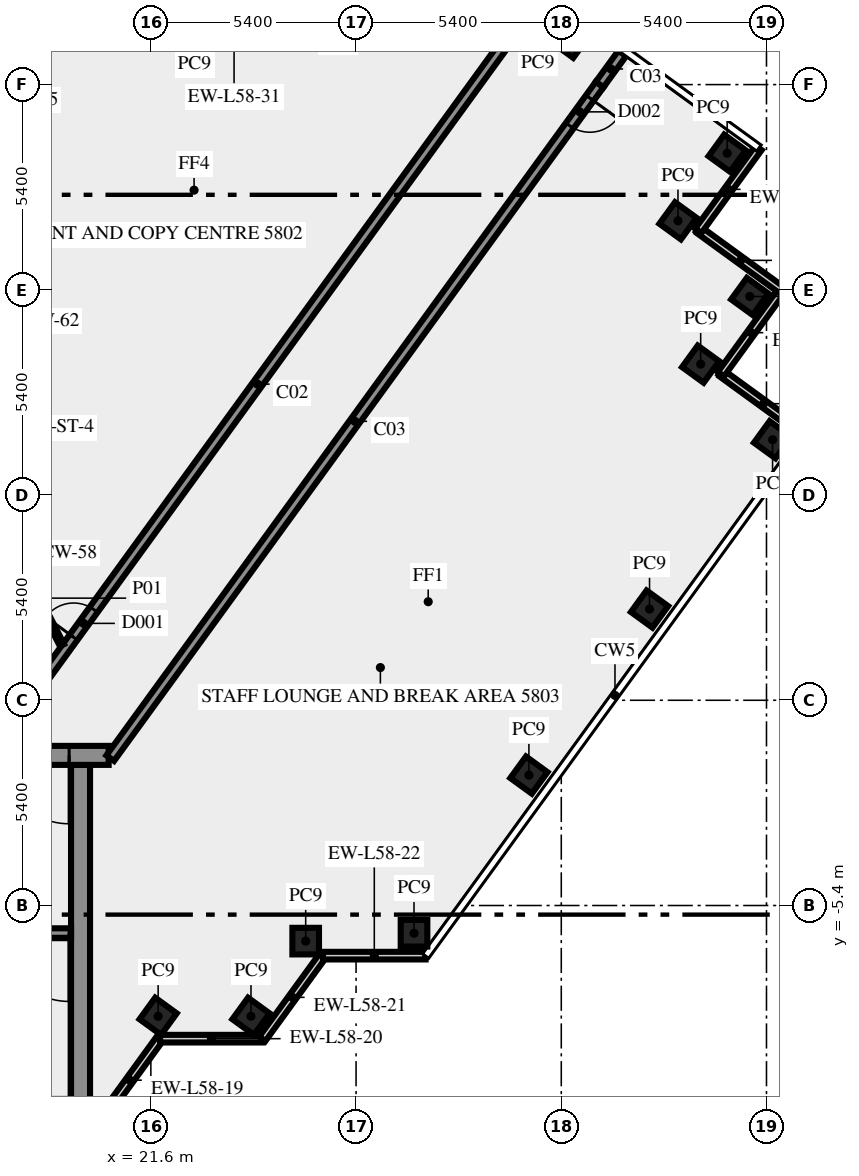
"""IFC4 building model, lengths in metres.
Left out: names, types, materials, properties, quantities, classifications, styles, units other than length and angle.
Written with IfcOpenShell. Run it as: python <this file> out.ifc"""

import sys

from ifc_helpers import new_model, si_unit, direction, frame, frame_2d, origin, origin_2d, place, context, subcontext, project, spatial, rectangle, extrude, element, fill, save


model = new_model("IFC4")
c1 = context("Model", 3, precision=1e-05, world=origin(), true_north=direction((0.0, 1.0)))
c2 = subcontext(c1, "Body", "Model", "MODEL_VIEW")
j1 = project(units=[si_unit("LENGTHUNIT", "METRE"), si_unit("PLANEANGLEUNIT", "RADIAN")], contexts=[c1])
p1 = place(None, origin())
s1 = spatial("IfcSite", under=j1, at=p1, CompositionType="ELEMENT")
p2 = place(p1, origin())
s2 = spatial("IfcBuilding", under=s1, at=p2, CompositionType="ELEMENT")
p3 = place(p2, frame((0.0, 0.0, 248.0)))
s3 = spatial("IfcBuildingStorey", under=s2, at=p3, CompositionType="ELEMENT", Elevation=248.0)
for number, where, z_axis, x_axis in (
    (1, (21.792, -8.315, 0.0), (0.0, 0.0, 1.0), (0.588, 0.809, 0.0)),
    (2, (24.235, -8.315, 0.0), (0.0, 0.0, 1.0), (0.588, 0.809, 0.0)),
    (3, (25.674, -6.337, 0.0), (0.0, 0.0, 1.0), (1.0, 0.0, 0.0)),
    (4, (28.525, -6.13, 0.0), (0.0, 0.0, 1.0), (1.0, 0.0, 0.0)),
    (5, (31.548, -1.969, 0.0), (0.0, 0.0, 1.0), (0.588, 0.809, 0.0)),
    (6, (34.722, 2.4, 0.0), (0.0, 0.0, 1.0), (0.588, 0.809, 0.0)),
    (7, (37.96, 6.855, 0.0), (0.0, 0.0, 1.0), (0.588, 0.809, 0.0)),
    (8, (36.068, 8.844, 0.0), (0.0, 0.0, 1.0), (0.588, 0.809, 0.0)),
    (9, (37.36, 10.625, 0.0), (0.0, 0.0, 1.0), (0.588, 0.809, 0.0)),
    (10, (35.471, 12.616, 0.0), (0.0, 0.0, 1.0), (-0.809, 0.588, 0.0)),
    (11, (36.765, 14.395, 0.0), (0.0, 0.0, 1.0), (-0.809, 0.588, 0.0)),
    (12, (32.637, 17.393, 0.0), (0.0, 0.0, 1.0), (-0.809, 0.588, 0.0)),
):
    element("IfcColumn", number, at=place(p3, frame(where, z_axis=z_axis, x_axis=x_axis)), inside=s3, PredefinedType="COLUMN", context=c2, shape_type="SweptSolid", body=[
        extrude(rectangle(XDim=0.7, YDim=0.7, at=origin_2d()), origin(), (0.0, 0.0, 1.0), 4.65),
    ])
p4 = place(p3, frame((20.253, -11.083, 0.0), z_axis=(0.0, 0.0, 1.0), x_axis=(0.587766567315, 0.809030569476, 0.0)))
e13 = element("IfcWall", 13, at=p4, inside=s3, PredefinedType="SOLIDWALL", context=c2, shape_type="SweptSolid", body=[
    extrude(rectangle(XDim=2.688, YDim=0.2, at=frame_2d((1.344, 0.0))), origin(), (0.0, 0.0, 1.0), 4.65),
])
p5 = place(p3, frame((21.843, -8.904, 0.0), z_axis=(0.0, 0.0, 1.0), x_axis=(1.0, 0.0, 0.0)))
e14 = element("IfcWall", 14, at=p5, inside=s3, PredefinedType="SOLIDWALL", context=c2, shape_type="SweptSolid", body=[
    extrude(rectangle(XDim=2.7, YDim=0.2, at=frame_2d((1.35, 0.0))), origin(), (0.0, 0.0, 1.0), 4.65),
])
p6 = place(p3, frame((24.533, -8.909, 0.0), z_axis=(0.0, 0.0, 1.0), x_axis=(0.587720002413, 0.809064397168, 0.0)))
e15 = element("IfcWall", 15, at=p6, inside=s3, PredefinedType="SOLIDWALL", context=c2, shape_type="SweptSolid", body=[
    extrude(rectangle(XDim=2.7, YDim=0.2, at=frame_2d((1.35, 0.0))), origin(), (0.0, 0.0, 1.0), 4.65),
])
for number, where, z_axis, x_axis in (
    (16, (26.13, -6.719, 0.0), (0.0, 0.0, 1.0), (1.0, 0.0, 0.0)),
    (17, (38.814, 7.01, 0.0), (0.0, 0.0, 1.0), (-0.809, 0.588, 0.0)),
    (18, (36.602, 8.58, 0.0), (0.0, 0.0, 1.0), (0.588, 0.809, 0.0)),
    (19, (38.216, 10.782, 0.0), (0.0, 0.0, 1.0), (-0.809, 0.588, 0.0)),
    (20, (36.005, 12.352, 0.0), (0.0, 0.0, 1.0), (0.588, 0.809, 0.0)),
):
    element("IfcWall", number, at=place(p3, frame(where, z_axis=z_axis, x_axis=x_axis)), inside=s3, PredefinedType="SOLIDWALL", context=c2, shape_type="SweptSolid", body=[
        extrude(rectangle(XDim=2.7, YDim=0.2, at=frame_2d((1.35, 0.0))), origin(), (0.0, 0.0, 1.0), 4.65),
    ])
p7 = place(p3, frame((19.75, -10.5, 0.0), z_axis=(0.0, 0.0, 1.0), x_axis=(0.0, 1.0, 0.0)))
e21 = element("IfcWall", 21, at=p7, inside=s3, PredefinedType="SHEAR", context=c2, shape_type="SweptSolid", body=[
    extrude(rectangle(XDim=8.8, YDim=0.5, at=frame_2d((4.4, 0.0))), origin(), (0.0, 0.0, 1.0), 4.65),
])
p8 = place(p3, frame((19.5, -6.125, 0.0), z_axis=(0.0, 0.0, 1.0), x_axis=(-1.0, 0.0, 0.0)))
e22 = element("IfcWall", 22, at=p8, inside=s3, PredefinedType="SHEAR", context=c2, shape_type="SweptSolid", body=[
    extrude(rectangle(XDim=8.05, YDim=0.25, at=frame_2d((4.025, 0.0))), origin(), (0.0, 0.0, 1.0), 4.65),
])
p9 = place(p8, frame((0.05, 0.0, 0.0)))
e23 = element("IfcOpeningElement", 23, at=p9, cuts=e22, PredefinedType="OPENING", context=c2, shape_type="SweptSolid", body=[
    extrude(rectangle(XDim=1.8, YDim=2.1, at=frame_2d((0.9, 1.05))), frame((0.0, 0.135, 0.0), z_axis=(0.0, -1.0, 0.0), x_axis=(1.0, 0.0, 0.0)), (0.0, 0.0, 1.0), 0.27),
])
p10 = place(p3, frame((20.49, -1.45, 0.0), z_axis=(0.0, 0.0, 1.0), x_axis=(-1.0, 0.0, 0.0)))
e24 = element("IfcWall", 24, at=p10, inside=s3, PredefinedType="SHEAR", context=c2, shape_type="SweptSolid", body=[
    extrude(rectangle(XDim=40.98, YDim=0.5, at=frame_2d((20.49, 0.0))), origin(), (0.0, 0.0, 1.0), 4.65),
])
p11 = place(p10, frame((38.14, 0.0, 0.0)))
e25 = element("IfcOpeningElement", 25, at=p11, cuts=e24, PredefinedType="OPENING", context=c2, shape_type="SweptSolid", body=[
    extrude(rectangle(XDim=1.8, YDim=2.1, at=frame_2d((0.9, 1.05))), frame((0.0, 0.26, 0.0), z_axis=(0.0, -1.0, 0.0), x_axis=(1.0, 0.0, 0.0)), (0.0, 0.0, 1.0), 0.52),
])
p12 = place(p10, frame((36.728, 0.0, 0.0)))
e26 = element("IfcOpeningElement", 26, at=p12, cuts=e24, PredefinedType="OPENING", context=c2, shape_type="SweptSolid", body=[
    extrude(rectangle(XDim=0.8, YDim=2.1, at=frame_2d((0.4, 1.05))), frame((0.0, 0.26, 0.0), z_axis=(0.0, -1.0, 0.0), x_axis=(1.0, 0.0, 0.0)), (0.0, 0.0, 1.0), 0.52),
])
p13 = place(p10, frame((35.153, 0.0, 0.0)))
e27 = element("IfcOpeningElement", 27, at=p13, cuts=e24, PredefinedType="OPENING", context=c2, shape_type="SweptSolid", body=[
    extrude(rectangle(XDim=0.8, YDim=2.1, at=frame_2d((0.4, 1.05))), frame((0.0, 0.26, 0.0), z_axis=(0.0, -1.0, 0.0), x_axis=(1.0, 0.0, 0.0)), (0.0, 0.0, 1.0), 0.52),
])
p14 = place(p10, frame((32.94, 0.0, 0.0)))
e28 = element("IfcOpeningElement", 28, at=p14, cuts=e24, PredefinedType="OPENING", context=c2, shape_type="SweptSolid", body=[
    extrude(rectangle(XDim=0.9, YDim=2.1, at=frame_2d((0.45, 1.05))), frame((0.0, 0.26, 0.0), z_axis=(0.0, -1.0, 0.0), x_axis=(1.0, 0.0, 0.0)), (0.0, 0.0, 1.0), 0.52),
])
p15 = place(p10, frame((31.015, 0.0, 0.0)))
e29 = element("IfcOpeningElement", 29, at=p15, cuts=e24, PredefinedType="OPENING", context=c2, shape_type="SweptSolid", body=[
    extrude(rectangle(XDim=0.8, YDim=2.1, at=frame_2d((0.4, 1.05))), frame((0.0, 0.26, 0.0), z_axis=(0.0, -1.0, 0.0), x_axis=(1.0, 0.0, 0.0)), (0.0, 0.0, 1.0), 0.52),
])
p16 = place(p10, frame((24.765, 0.0, 0.0)))
e30 = element("IfcOpeningElement", 30, at=p16, cuts=e24, PredefinedType="OPENING", context=c2, shape_type="SweptSolid", body=[
    extrude(rectangle(XDim=0.8, YDim=2.1, at=frame_2d((0.4, 1.05))), frame((0.0, 0.26, 0.0), z_axis=(0.0, -1.0, 0.0), x_axis=(1.0, 0.0, 0.0)), (0.0, 0.0, 1.0), 0.52),
])
p17 = place(p10, frame((19.59, 0.0, 0.0)))
e31 = element("IfcOpeningElement", 31, at=p17, cuts=e24, PredefinedType="OPENING", context=c2, shape_type="SweptSolid", body=[
    extrude(rectangle(XDim=2.0, YDim=2.1, at=frame_2d((1.0, 1.05))), frame((0.0, 0.26, 0.0), z_axis=(0.0, -1.0, 0.0), x_axis=(1.0, 0.0, 0.0)), (0.0, 0.0, 1.0), 0.52),
])
p18 = place(p10, frame((7.14, 0.0, 0.0)))
e32 = element("IfcOpeningElement", 32, at=p18, cuts=e24, PredefinedType="OPENING", context=c2, shape_type="SweptSolid", body=[
    extrude(rectangle(XDim=0.9, YDim=2.1, at=frame_2d((0.45, 1.05))), frame((0.0, 0.26, 0.0), z_axis=(0.0, -1.0, 0.0), x_axis=(1.0, 0.0, 0.0)), (0.0, 0.0, 1.0), 0.52),
])
p19 = place(p10, frame((4.19, 0.0, 0.0)))
e33 = element("IfcOpeningElement", 33, at=p19, cuts=e24, PredefinedType="OPENING", context=c2, shape_type="SweptSolid", body=[
    extrude(rectangle(XDim=0.9, YDim=2.1, at=frame_2d((0.45, 1.05))), frame((0.0, 0.26, 0.0), z_axis=(0.0, -1.0, 0.0), x_axis=(1.0, 0.0, 0.0)), (0.0, 0.0, 1.0), 0.52),
])
p20 = place(p10, frame((1.04, 0.0, 0.0)))
e34 = element("IfcOpeningElement", 34, at=p20, cuts=e24, PredefinedType="OPENING", context=c2, shape_type="SweptSolid", body=[
    extrude(rectangle(XDim=1.8, YDim=2.1, at=frame_2d((0.9, 1.05))), frame((0.0, 0.26, 0.0), z_axis=(0.0, -1.0, 0.0), x_axis=(1.0, 0.0, 0.0)), (0.0, 0.0, 1.0), 0.52),
])
p21 = place(p3, frame((17.545, -1.125, 0.0), z_axis=(0.0, 0.0, 1.0), x_axis=(0.587787966774, 0.809015022181, 0.0)))
e35 = element("IfcWall", 35, at=p21, inside=s3, PredefinedType="SOLIDWALL", context=c2, shape_type="SweptSolid", body=[
    extrude(rectangle(XDim=23.345, YDim=0.25, at=frame_2d((11.672, 0.0))), origin(), (0.0, 0.0, 1.0), 4.65),
])
p22 = place(p21, frame((3.441, 0.0, 0.0)))
e36 = element("IfcOpeningElement", 36, at=p22, cuts=e35, PredefinedType="OPENING", context=c2, shape_type="SweptSolid", body=[
    extrude(rectangle(XDim=0.9, YDim=2.1, at=frame_2d((0.45, 1.05))), frame((0.0, 0.135, 0.0), z_axis=(0.0, -1.0, 0.0), x_axis=(1.0, 0.0, 0.0)), (0.0, 0.0, 1.0), 0.27),
])
p23 = place(p3, frame((33.41, 16.203, 0.0), z_axis=(0.0, 0.0, 1.0), x_axis=(-0.587786711753, -0.809015934013, 0.0)))
e37 = element("IfcWall", 37, at=p23, inside=s3, PredefinedType="SOLIDWALL", context=c2, shape_type="SweptSolid", body=[
    extrude(rectangle(XDim=21.911, YDim=0.25, at=frame_2d((10.956, 0.0))), origin(), (0.0, 0.0, 1.0), 4.65),
])
p24 = place(p23, frame((0.441, 0.0, 0.0)))
e38 = element("IfcOpeningElement", 38, at=p24, cuts=e37, PredefinedType="OPENING", context=c2, shape_type="SweptSolid", body=[
    extrude(rectangle(XDim=0.9, YDim=2.1, at=frame_2d((0.45, 1.05))), frame((0.0, 0.135, 0.0), z_axis=(0.0, -1.0, 0.0), x_axis=(1.0, 0.0, 0.0)), (0.0, 0.0, 1.0), 0.27),
])
p25 = place(p3, frame((18.0, 3.925, 0.0), z_axis=(0.0, 0.0, 1.0), x_axis=(0.453950796792, -0.891026752736, 0.0)))
e39 = element("IfcWall", 39, at=p25, inside=s3, PredefinedType="PARTITIONING", context=c2, shape_type="SweptSolid", body=[
    extrude(rectangle(XDim=2.778, YDim=0.12, at=frame_2d((1.389, 0.0))), origin(), (0.0, 0.0, 1.0), 4.65),
])
p26 = place(p3, frame((33.41, 16.203, 0.0), z_axis=(0.0, 0.0, 1.0), x_axis=(0.587696850957, 0.809081214326, 0.0)))
e40 = element("IfcWall", 40, at=p26, inside=s3, PredefinedType="SOLIDWALL", context=c2, shape_type="SweptSolid", body=[
    extrude(rectangle(XDim=1.009, YDim=0.25, at=frame_2d((0.504, 0.0))), origin(), (0.0, 0.0, 1.0), 3.95),
])
p27 = place(p9, origin())
e41 = element("IfcDoor", 41, at=p27, inside=s3, OperationType="DOUBLE_DOOR_SINGLE_SWING", PredefinedType="DOOR", context=c2, shape_type="SweptSolid", body=[
    extrude(rectangle(XDim=1.8, YDim=2.1, at=frame_2d((0.9, 1.05))), frame((0.0, 0.025, 0.0), z_axis=(0.0, -1.0, 0.0), x_axis=(1.0, 0.0, 0.0)), (0.0, 0.0, 1.0), 0.05),
])
fill(e23, e41)
p28 = place(p20, origin())
e42 = element("IfcDoor", 42, at=p28, inside=s3, OperationType="DOUBLE_DOOR_SINGLE_SWING", PredefinedType="DOOR", context=c2, shape_type="SweptSolid", body=[
    extrude(rectangle(XDim=1.8, YDim=2.1, at=frame_2d((0.9, 1.05))), frame((0.0, 0.025, 0.0), z_axis=(0.0, -1.0, 0.0), x_axis=(1.0, 0.0, 0.0)), (0.0, 0.0, 1.0), 0.05),
])
fill(e34, e42)
p29 = place(p24, origin())
e43 = element("IfcDoor", 43, at=p29, inside=s3, OperationType="SINGLE_SWING_LEFT", PredefinedType="DOOR", context=c2, shape_type="SweptSolid", body=[
    extrude(rectangle(XDim=0.9, YDim=2.1, at=frame_2d((0.45, 1.05))), frame((0.0, 0.025, 0.0), z_axis=(0.0, -1.0, 0.0), x_axis=(1.0, 0.0, 0.0)), (0.0, 0.0, 1.0), 0.05),
])
fill(e38, e43)
p30 = place(p22, origin())
e44 = element("IfcDoor", 44, at=p30, inside=s3, OperationType="SINGLE_SWING_LEFT", PredefinedType="DOOR", context=c2, shape_type="SweptSolid", body=[
    extrude(rectangle(XDim=0.9, YDim=2.1, at=frame_2d((0.45, 1.05))), frame((0.0, 0.025, 0.0), z_axis=(0.0, -1.0, 0.0), x_axis=(1.0, 0.0, 0.0)), (0.0, 0.0, 1.0), 0.05),
])
fill(e36, e44)
save(model, sys.argv[1])
